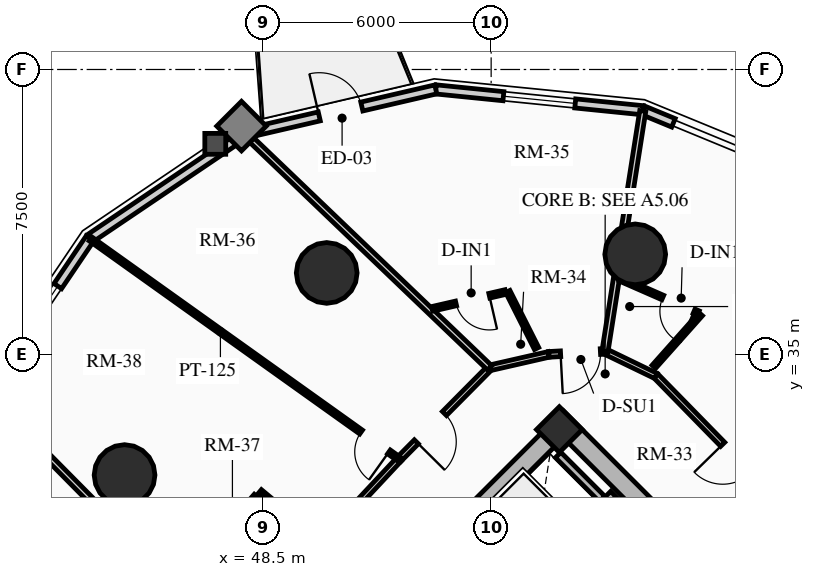
"""IFC4 building model, lengths in metres.
Left out: names, types, materials, properties, quantities, classifications, styles, units other than length and angle.
Written with IfcOpenShell. Run it as: python <this file> out.ifc"""

import sys

from ifc_helpers import new_model, si_unit, direction, frame, frame_2d, origin, origin_2d, place, context, subcontext, project, spatial, rectangle, circle, extrude, source, transform, mapped, element, fill, save


model = new_model("IFC4")
c1 = context("Model", 3, precision=1e-05, world=origin(), true_north=direction((0.0, 1.0)))
c2 = subcontext(c1, "Body", "Model", "MODEL_VIEW")
j1 = project(units=[si_unit("LENGTHUNIT", "METRE"), si_unit("PLANEANGLEUNIT", "RADIAN")], contexts=[c1])
p1 = place(None, origin())
s1 = spatial("IfcSite", under=j1, at=p1, CompositionType="ELEMENT")
p2 = place(p1, origin())
s2 = spatial("IfcBuilding", under=s1, at=p2, CompositionType="ELEMENT")
p3 = place(p2, frame((0.0, 0.0, 48.19)))
s3 = spatial("IfcBuildingStorey", under=s2, at=p3, CompositionType="ELEMENT", Elevation=48.19)
p4 = place(p3, frame((66.339, 23.227, 0.0), z_axis=(0.0, 0.0, 1.0), x_axis=(-0.707106781187, 0.707106781187, 0.0)))
e1 = element("IfcWall", 1, at=p4, inside=s3, PredefinedType="SHEAR", context=c2, shape_type="SweptSolid", body=[
    extrude(rectangle(XDim=14.3, YDim=0.5, at=frame_2d((7.15, 0.0))), origin(), (0.0, 0.0, 1.0), 2.91),
])
p5 = place(p3, frame((48.838, 25.596, 0.0), z_axis=(0.0, 0.0, 1.0), x_axis=(0.707106781187, 0.707106781187, 0.0)))
e2 = element("IfcWall", 2, at=p5, inside=s3, PredefinedType="SHEAR", context=c2, shape_type="SweptSolid", body=[
    extrude(rectangle(XDim=10.7, YDim=0.5, at=frame_2d((5.35, 0.0))), origin(), (0.0, 0.0, 1.0), 2.91),
])
m1 = source(origin(), c2, "Body", "SweptSolid", [
    extrude(rectangle(XDim=1.5, YDim=2.02, at=frame_2d((0.75, 1.01))), frame((0.0, 0.26, 0.0), z_axis=(0.0, -1.0, 0.0), x_axis=(1.0, 0.0, 0.0)), (0.0, 0.0, 1.0), 0.52),
])
p6 = place(p5, frame((4.6, 0.0, 0.0)))
e3 = element("IfcOpeningElement", 3, at=p6, cuts=e2, PredefinedType="OPENING", context=c2, shape_type="MappedRepresentation", body=[
    mapped(m1, transform((0.0, 0.0, 0.0), x_axis=(1.0, 0.0, 0.0), y_axis=(0.0, 1.0, 0.0), z_axis=(0.0, 0.0, 1.0), scale=1.0)),
])
p7 = place(p3, frame((56.294, 33.024, 0.0), z_axis=(0.0, 0.0, 1.0), x_axis=(0.707106781187, 0.707106781187, 0.0)))
e4 = element("IfcColumn", 4, at=p7, inside=s3, PredefinedType="COLUMN", context=c2, shape_type="SweptSolid", body=[
    extrude(rectangle(XDim=0.85, YDim=0.85, at=origin_2d()), origin(), (0.0, 0.0, 1.0), 2.91),
])
for number, where, z_axis, x_axis in (
    (5, (58.291, 37.635, 0.0), (0.0, 0.0, 1.0), (1.0, 0.0, 0.0)),
    (6, (50.173, 37.146, 0.0), (0.0, 0.0, 1.0), (1.0, 0.0, 0.0)),
    (7, (44.854, 31.827, 0.0), (0.0, 0.0, 1.0), (1.0, 0.0, 0.0)),
):
    element("IfcColumn", number, at=place(p3, frame(where, z_axis=z_axis, x_axis=x_axis)), inside=s3, PredefinedType="USERDEFINED", context=c2, shape_type="SweptSolid", body=[
        extrude(circle(Radius=0.8, at=origin_2d()), origin(), (0.0, 0.0, 1.0), 2.91),
    ])
p8 = place(p3, frame((58.493, 41.428, 0.0), z_axis=(0.0, 0.0, 1.0), x_axis=(0.924556017656, -0.381046152345, 0.0)))
e8 = element("IfcWall", 8, at=p8, inside=s3, PredefinedType="SOLIDWALL", context=c2, shape_type="SweptSolid", body=[
    extrude(rectangle(XDim=0.87, YDim=0.24, at=frame_2d((0.435, 0.0))), origin(), (0.0, 0.0, 1.0), 2.073),
])
p9 = place(p3, frame((53.043, 41.976, 0.0), z_axis=(0.0, 0.0, 1.0), x_axis=(0.994970765694, -0.100165739718, 0.0)))
e9 = element("IfcWall", 9, at=p9, inside=s3, PredefinedType="SOLIDWALL", context=c2, shape_type="SweptSolid", body=[
    extrude(rectangle(XDim=5.477, YDim=0.24, at=frame_2d((2.738, 0.0))), origin(), (0.0, 0.0, 1.0), 2.073),
])
m2 = source(origin(), c2, "Body", "SweptSolid", [
    extrude(rectangle(XDim=1.9, YDim=1.35, at=frame_2d((0.95, 0.675))), frame((0.0, 0.13, 0.0), z_axis=(0.0, -1.0, 0.0), x_axis=(1.0, 0.0, 0.0)), (0.0, 0.0, 1.0), 0.26),
])
p10 = place(p9, frame((1.788, 0.0, 0.65)))
e10 = element("IfcOpeningElement", 10, at=p10, cuts=e9, PredefinedType="OPENING", context=c2, shape_type="MappedRepresentation", body=[
    mapped(m2, transform((0.0, 0.0, 0.0), x_axis=(1.0, 0.0, 0.0), y_axis=(0.0, 1.0, 0.0), z_axis=(0.0, 0.0, 1.0), scale=1.0)),
])
p11 = place(p3, frame((48.031, 40.814, 0.0), z_axis=(0.0, 0.0, 1.0), x_axis=(0.974166016949, 0.225833060959, 0.0)))
e11 = element("IfcWall", 11, at=p11, inside=s3, PredefinedType="SOLIDWALL", context=c2, shape_type="SweptSolid", body=[
    extrude(rectangle(XDim=5.146, YDim=0.24, at=frame_2d((2.573, 0.0))), origin(), (0.0, 0.0, 1.0), 2.073),
])
m3 = source(origin(), c2, "Body", "SweptSolid", [
    extrude(rectangle(XDim=1.15, YDim=2.005, at=frame_2d((0.575, 1.002))), frame((0.0, 0.13, 0.0), z_axis=(0.0, -1.0, 0.0), x_axis=(1.0, 0.0, 0.0)), (0.0, 0.0, 1.0), 0.26),
])
p12 = place(p11, frame((1.998, 0.0, 0.0)))
e12 = element("IfcOpeningElement", 12, at=p12, cuts=e11, PredefinedType="OPENING", context=c2, shape_type="MappedRepresentation", body=[
    mapped(m3, transform((0.0, 0.0, 0.0), x_axis=(1.0, 0.0, 0.0), y_axis=(0.0, 1.0, 0.0), z_axis=(0.0, 0.0, 1.0), scale=1.0)),
])
p13 = place(p3, frame((43.945, 38.055, 0.0), z_axis=(0.0, 0.0, 1.0), x_axis=(0.828736708604, 0.559638693991, 0.0)))
e13 = element("IfcWall", 13, at=p13, inside=s3, PredefinedType="SOLIDWALL", context=c2, shape_type="SweptSolid", body=[
    extrude(rectangle(XDim=4.93, YDim=0.24, at=frame_2d((2.465, 0.0))), origin(), (0.0, 0.0, 1.0), 2.073),
])
p14 = place(p3, frame((41.186, 33.969, 0.0), z_axis=(0.0, 0.0, 1.0), x_axis=(0.559638693991, 0.828736708604, 0.0)))
e14 = element("IfcWall", 14, at=p14, inside=s3, PredefinedType="SOLIDWALL", context=c2, shape_type="SweptSolid", body=[
    extrude(rectangle(XDim=4.93, YDim=0.24, at=frame_2d((2.465, 0.0))), origin(), (0.0, 0.0, 1.0), 2.073),
])
p15 = place(p14, frame((1.515, 0.0, 0.65)))
e15 = element("IfcOpeningElement", 15, at=p15, cuts=e14, PredefinedType="OPENING", context=c2, shape_type="MappedRepresentation", body=[
    mapped(m2, transform((0.0, 0.0, 0.0), x_axis=(1.0, 0.0, 0.0), y_axis=(0.0, 1.0, 0.0), z_axis=(0.0, 0.0, 1.0), scale=1.0)),
])
p16 = place(p3, frame((55.615, 29.227, 0.0), z_axis=(0.0, 0.0, 1.0), x_axis=(0.707147878904, 0.70706568108, 0.0)))
e16 = element("IfcWall", 16, at=p16, inside=s3, PredefinedType="SHEAR", context=c2, shape_type="SweptSolid", body=[
    extrude(rectangle(XDim=2.97, YDim=0.2, at=frame_2d((1.485, 0.0))), origin(), (0.0, 0.0, 1.0), 2.91),
])
p17 = place(p3, frame((57.419, 31.2, 0.0), z_axis=(0.0, 0.0, 1.0), x_axis=(-0.707032117043, 0.707181437447, 0.0)))
e17 = element("IfcWall", 17, at=p17, inside=s3, PredefinedType="SHEAR", context=c2, shape_type="SweptSolid", body=[
    extrude(rectangle(XDim=1.635, YDim=0.2, at=frame_2d((0.817, 0.0))), origin(), (0.0, 0.0, 1.0), 2.91),
])
p18 = place(p3, frame((63.086, 30.086, 0.0), z_axis=(0.0, 0.0, 1.0), x_axis=(-0.699032802832, 0.715089603172, 0.0)))
e18 = element("IfcWall", 18, at=p18, inside=s3, PredefinedType="PARTITIONING", context=c2, shape_type="SweptSolid", body=[
    extrude(rectangle(XDim=6.082, YDim=0.15, at=frame_2d((3.041, 0.0))), origin(), (0.0, 0.0, 1.0), 2.159),
])
m4 = source(origin(), c2, "Body", "SweptSolid", [
    extrude(rectangle(XDim=1.05, YDim=2.015, at=frame_2d((0.525, 1.007))), frame((0.0, 0.085, 0.0), z_axis=(0.0, -1.0, 0.0), x_axis=(1.0, 0.0, 0.0)), (0.0, 0.0, 1.0), 0.17),
])
p19 = place(p18, frame((2.516, 0.0, 0.0)))
e19 = element("IfcOpeningElement", 19, at=p19, cuts=e18, PredefinedType="OPENING", context=c2, shape_type="MappedRepresentation", body=[
    mapped(m4, transform((0.0, 0.0, 0.0), x_axis=(1.0, 0.0, 0.0), y_axis=(0.0, 1.0, 0.0), z_axis=(0.0, 0.0, 1.0), scale=1.0)),
])
p20 = place(p3, frame((58.835, 34.435, 0.0), z_axis=(0.0, 0.0, 1.0), x_axis=(-0.900352167336, 0.4351620098, 0.0)))
e20 = element("IfcWall", 20, at=p20, inside=s3, PredefinedType="PARTITIONING", context=c2, shape_type="SweptSolid", body=[
    extrude(rectangle(XDim=1.488, YDim=0.15, at=frame_2d((0.744, 0.0))), origin(), (0.0, 0.0, 1.0), 2.205),
])
p21 = place(p3, frame((57.495, 35.083, 0.0), z_axis=(0.0, 0.0, 1.0), x_axis=(-0.998536503254, -0.054081897798, 0.0)))
e21 = element("IfcWall", 21, at=p21, inside=s3, PredefinedType="PARTITIONING", context=c2, shape_type="SweptSolid", body=[
    extrude(rectangle(XDim=1.481, YDim=0.15, at=frame_2d((0.74, 0.0))), origin(), (0.0, 0.0, 1.0), 2.159),
])
p22 = place(p21, frame((0.12, 0.0, 0.0)))
e22 = element("IfcOpeningElement", 22, at=p22, cuts=e21, PredefinedType="OPENING", context=c2, shape_type="MappedRepresentation", body=[
    mapped(m4, transform((0.0, 0.0, 0.0), x_axis=(1.0, 0.0, 0.0), y_axis=(0.0, 1.0, 0.0), z_axis=(0.0, 0.0, 1.0), scale=1.0)),
])
p23 = place(p3, frame((56.017, 35.003, 0.0), z_axis=(0.0, 0.0, 1.0), x_axis=(-0.974924954781, -0.222533890777, 0.0)))
e23 = element("IfcWall", 23, at=p23, inside=s3, PredefinedType="PARTITIONING", context=c2, shape_type="SweptSolid", body=[
    extrude(rectangle(XDim=1.595, YDim=0.15, at=frame_2d((0.798, 0.0))), origin(), (0.0, 0.0, 1.0), 2.205),
])
p24 = place(p3, frame((54.461, 34.648, 0.0), z_axis=(0.0, 0.0, 1.0), x_axis=(-0.70403409755, -0.710166170334, 0.0)))
e24 = element("IfcWall", 24, at=p24, inside=s3, PredefinedType="PARTITIONING", context=c2, shape_type="SweptSolid", body=[
    extrude(rectangle(XDim=3.384, YDim=0.15, at=frame_2d((1.692, 0.0))), origin(), (0.0, 0.0, 1.0), 2.159),
])
p25 = place(p24, frame((1.691, 0.0, 0.0)))
e25 = element("IfcOpeningElement", 25, at=p25, cuts=e24, PredefinedType="OPENING", context=c2, shape_type="MappedRepresentation", body=[
    mapped(m4, transform((0.0, 0.0, 0.0), x_axis=(1.0, 0.0, 0.0), y_axis=(0.0, 1.0, 0.0), z_axis=(0.0, 0.0, 1.0), scale=1.0)),
])
p26 = place(p3, frame((52.079, 32.244, 0.0), z_axis=(0.0, 0.0, 1.0), x_axis=(-0.682703325574, -0.730695674854, 0.0)))
e26 = element("IfcWall", 26, at=p26, inside=s3, PredefinedType="PARTITIONING", context=c2, shape_type="SweptSolid", body=[
    extrude(rectangle(XDim=6.527, YDim=0.15, at=frame_2d((3.263, 0.0))), origin(), (0.0, 0.0, 1.0), 2.159),
])
p27 = place(p3, frame((57.495, 35.083, 0.0), z_axis=(0.0, 0.0, 1.0), x_axis=(0.155296837382, 0.987867851638, 0.0)))
e27 = element("IfcWall", 27, at=p27, inside=s3, PredefinedType="PARTITIONING", context=c2, shape_type="SweptSolid", body=[
    extrude(rectangle(XDim=6.403, YDim=0.16, at=frame_2d((3.202, 0.0))), origin(), (0.0, 0.0, 1.0), 2.073),
])
p28 = place(p3, frame((54.461, 34.648, 0.0), z_axis=(0.0, 0.0, 1.0), x_axis=(-0.722290498621, 0.691589788532, 0.0)))
e28 = element("IfcWall", 28, at=p28, inside=s3, PredefinedType="PARTITIONING", context=c2, shape_type="SweptSolid", body=[
    extrude(rectangle(XDim=8.891, YDim=0.16, at=frame_2d((4.445, 0.0))), origin(), (0.0, 0.0, 1.0), 2.073),
])
p29 = place(p3, frame((47.623, 27.475, 0.0), z_axis=(0.0, 0.0, 1.0), x_axis=(-0.703512438021, 0.71068294587, 0.0)))
e29 = element("IfcWall", 29, at=p29, inside=s3, PredefinedType="PARTITIONING", context=c2, shape_type="SweptSolid", body=[
    extrude(rectangle(XDim=9.125, YDim=0.16, at=frame_2d((4.562, 0.0))), origin(), (0.0, 0.0, 1.0), 2.073),
])
p30 = place(p3, frame((55.695, 35.158, 0.0), z_axis=(0.0, 0.0, 1.0), x_axis=(-0.450698346964, 0.892676313142, 0.0)))
e30 = element("IfcWall", 30, at=p30, inside=s3, PredefinedType="PARTITIONING", context=c2, shape_type="SweptSolid", body=[
    extrude(rectangle(XDim=1.68, YDim=0.125, at=frame_2d((0.84, 0.0))), origin(), (0.0, 0.0, 1.0), 2.205),
])
p31 = place(p3, frame((54.878, 36.644, 0.0), z_axis=(0.0, 0.0, 1.0), x_axis=(-0.974554917581, -0.224148862631, 0.0)))
e31 = element("IfcWall", 31, at=p31, inside=s3, PredefinedType="PARTITIONING", context=c2, shape_type="SweptSolid", body=[
    extrude(rectangle(XDim=1.982, YDim=0.125, at=frame_2d((0.991, 0.0))), origin(), (0.0, 0.0, 1.0), 2.635),
])
m5 = source(origin(), c2, "Body", "SweptSolid", [
    extrude(rectangle(XDim=0.9, YDim=2.005, at=frame_2d((0.45, 1.002))), frame((0.0, 0.073, 0.0), z_axis=(0.0, -1.0, 0.0), x_axis=(1.0, 0.0, 0.0)), (0.0, 0.0, 1.0), 0.145),
])
p32 = place(p31, frame((0.436, 0.0, 0.0)))
e32 = element("IfcOpeningElement", 32, at=p32, cuts=e31, PredefinedType="OPENING", context=c2, shape_type="MappedRepresentation", body=[
    mapped(m5, transform((0.0, 0.0, 0.0), x_axis=(1.0, 0.0, 0.0), y_axis=(0.0, 1.0, 0.0), z_axis=(0.0, 0.0, 1.0), scale=1.0)),
])
p33 = place(p3, frame((52.079, 32.244, 0.0), z_axis=(0.0, 0.0, 1.0), x_axis=(-0.813888867537, 0.581020577346, 0.0)))
e33 = element("IfcWall", 33, at=p33, inside=s3, PredefinedType="PARTITIONING", context=c2, shape_type="SweptSolid", body=[
    extrude(rectangle(XDim=9.977, YDim=0.125, at=frame_2d((4.988, 0.0))), origin(), (0.0, 0.0, 1.0), 2.073),
])
p34 = place(p33, frame((0.33, 0.0, 0.0)))
e34 = element("IfcOpeningElement", 34, at=p34, cuts=e33, PredefinedType="OPENING", context=c2, shape_type="MappedRepresentation", body=[
    mapped(m5, transform((0.0, 0.0, 0.0), x_axis=(1.0, 0.0, 0.0), y_axis=(0.0, 1.0, 0.0), z_axis=(0.0, 0.0, 1.0), scale=1.0)),
])
p35 = place(p3, frame((49.809, 30.234, 0.0), z_axis=(0.0, 0.0, 1.0), x_axis=(-0.76830950514, 0.640078514177, 0.0)))
e35 = element("IfcWall", 35, at=p35, inside=s3, PredefinedType="PARTITIONING", context=c2, shape_type="SweptSolid", body=[
    extrude(rectangle(XDim=1.814, YDim=0.125, at=frame_2d((0.907, 0.0))), origin(), (0.0, 0.0, 1.0), 2.635),
])
p36 = place(p3, frame((48.313, 31.28, 0.0), z_axis=(0.0, 0.0, 1.0), x_axis=(-0.662230126621, -0.749300513409, 0.0)))
e36 = element("IfcWall", 36, at=p36, inside=s3, PredefinedType="PARTITIONING", context=c2, shape_type="SweptSolid", body=[
    extrude(rectangle(XDim=2.958, YDim=0.125, at=frame_2d((1.479, 0.0))), origin(), (0.0, 0.0, 1.0), 2.159),
])
p37 = place(p36, frame((0.12, 0.0, 0.0)))
e37 = element("IfcOpeningElement", 37, at=p37, cuts=e36, PredefinedType="OPENING", context=c2, shape_type="MappedRepresentation", body=[
    mapped(m5, transform((0.0, 0.0, 0.0), x_axis=(1.0, 0.0, 0.0), y_axis=(0.0, 1.0, 0.0), z_axis=(0.0, 0.0, 1.0), scale=1.0)),
])
p38 = place(p3, frame((58.78, 34.676, 0.0), z_axis=(0.0, 0.0, 1.0), x_axis=(0.6649433297, 0.746893813261, 0.0)))
e38 = element("IfcWall", 38, at=p38, inside=s3, PredefinedType="PARTITIONING", context=c2, shape_type="SweptSolid", body=[
    extrude(rectangle(XDim=1.856, YDim=0.125, at=frame_2d((0.928, 0.0))), origin(), (0.0, 0.0, 1.0), 2.205),
])
p39 = place(p3, frame((59.95, 36.09, 0.0), z_axis=(0.0, 0.0, 1.0), x_axis=(-0.916037613906, 0.401092370795, 0.0)))
e39 = element("IfcWall", 39, at=p39, inside=s3, PredefinedType="PARTITIONING", context=c2, shape_type="SweptSolid", body=[
    extrude(rectangle(XDim=2.247, YDim=0.125, at=frame_2d((1.124, 0.0))), origin(), (0.0, 0.0, 1.0), 2.159),
])
p40 = place(p39, frame((0.12, 0.0, 0.0)))
e40 = element("IfcOpeningElement", 40, at=p40, cuts=e39, PredefinedType="OPENING", context=c2, shape_type="MappedRepresentation", body=[
    mapped(m5, transform((0.0, 0.0, 0.0), x_axis=(1.0, 0.0, 0.0), y_axis=(0.0, 1.0, 0.0), z_axis=(0.0, 0.0, 1.0), scale=1.0)),
])
m6 = source(origin(), c2, "Body", "SweptSolid", [
    extrude(rectangle(XDim=1.9, YDim=1.35, at=frame_2d((0.95, 0.675))), frame((0.0, 0.03, 0.0), z_axis=(0.0, -1.0, 0.0), x_axis=(1.0, 0.0, 0.0)), (0.0, 0.0, 1.0), 0.06),
])
p41 = place(p10, origin())
e41 = element("IfcWindow", 41, at=p41, inside=s3, PartitioningType="DOUBLE_PANEL_VERTICAL", PredefinedType="WINDOW", context=c2, shape_type="MappedRepresentation", body=[
    mapped(m6, transform((0.0, 0.0, 0.0), x_axis=(1.0, 0.0, 0.0), y_axis=(0.0, 1.0, 0.0), z_axis=(0.0, 0.0, 1.0), scale=1.0)),
])
fill(e10, e41)
m7 = source(origin(), c2, "Body", "SweptSolid", [
    extrude(rectangle(XDim=1.15, YDim=2.005, at=frame_2d((0.575, 1.002))), frame((0.0, 0.025, 0.0), z_axis=(0.0, -1.0, 0.0), x_axis=(1.0, 0.0, 0.0)), (0.0, 0.0, 1.0), 0.05),
])
p42 = place(p12, origin())
e42 = element("IfcDoor", 42, at=p42, inside=s3, OperationType="SINGLE_SWING_LEFT", PredefinedType="DOOR", context=c2, shape_type="MappedRepresentation", body=[
    mapped(m7, transform((0.0, 0.0, 0.0), x_axis=(1.0, 0.0, 0.0), y_axis=(0.0, 1.0, 0.0), z_axis=(0.0, 0.0, 1.0), scale=1.0)),
])
fill(e12, e42)
p43 = place(p15, origin())
e43 = element("IfcWindow", 43, at=p43, inside=s3, PartitioningType="DOUBLE_PANEL_VERTICAL", PredefinedType="WINDOW", context=c2, shape_type="MappedRepresentation", body=[
    mapped(m6, transform((0.0, 0.0, 0.0), x_axis=(1.0, 0.0, 0.0), y_axis=(0.0, 1.0, 0.0), z_axis=(0.0, 0.0, 1.0), scale=1.0)),
])
fill(e15, e43)
m8 = source(origin(), c2, "Body", "SweptSolid", [
    extrude(rectangle(XDim=1.05, YDim=2.015, at=frame_2d((0.525, 1.007))), frame((0.0, 0.025, 0.0), z_axis=(0.0, -1.0, 0.0), x_axis=(1.0, 0.0, 0.0)), (0.0, 0.0, 1.0), 0.05),
])
p44 = place(p22, origin())
e44 = element("IfcDoor", 44, at=p44, inside=s3, OperationType="SINGLE_SWING_RIGHT", PredefinedType="DOOR", context=c2, shape_type="MappedRepresentation", body=[
    mapped(m8, transform((0.0, 0.0, 0.0), x_axis=(1.0, 0.0, 0.0), y_axis=(0.0, 1.0, 0.0), z_axis=(0.0, 0.0, 1.0), scale=1.0)),
])
fill(e22, e44)
m9 = source(origin(), c2, "Body", "SweptSolid", [
    extrude(rectangle(XDim=0.9, YDim=2.005, at=frame_2d((0.45, 1.002))), frame((0.0, 0.025, 0.0), z_axis=(0.0, -1.0, 0.0), x_axis=(1.0, 0.0, 0.0)), (0.0, 0.0, 1.0), 0.05),
])
p45 = place(p32, origin())
e45 = element("IfcDoor", 45, at=p45, inside=s3, OperationType="SINGLE_SWING_LEFT", PredefinedType="DOOR", context=c2, shape_type="MappedRepresentation", body=[
    mapped(m9, transform((0.0, 0.0, 0.0), x_axis=(1.0, 0.0, 0.0), y_axis=(0.0, 1.0, 0.0), z_axis=(0.0, 0.0, 1.0), scale=1.0)),
])
fill(e32, e45)
p46 = place(p25, origin())
e46 = element("IfcDoor", 46, at=p46, inside=s3, OperationType="SINGLE_SWING_RIGHT", PredefinedType="DOOR", context=c2, shape_type="MappedRepresentation", body=[
    mapped(m8, transform((0.0, 0.0, 0.0), x_axis=(1.0, 0.0, 0.0), y_axis=(0.0, 1.0, 0.0), z_axis=(0.0, 0.0, 1.0), scale=1.0)),
])
fill(e25, e46)
p47 = place(p34, origin())
e47 = element("IfcDoor", 47, at=p47, inside=s3, OperationType="SINGLE_SWING_LEFT", PredefinedType="DOOR", context=c2, shape_type="MappedRepresentation", body=[
    mapped(m9, transform((0.0, 0.0, 0.0), x_axis=(1.0, 0.0, 0.0), y_axis=(0.0, 1.0, 0.0), z_axis=(0.0, 0.0, 1.0), scale=1.0)),
])
fill(e34, e47)
p48 = place(p19, origin())
e48 = element("IfcDoor", 48, at=p48, inside=s3, OperationType="SINGLE_SWING_RIGHT", PredefinedType="DOOR", context=c2, shape_type="MappedRepresentation", body=[
    mapped(m8, transform((0.0, 0.0, 0.0), x_axis=(1.0, 0.0, 0.0), y_axis=(0.0, 1.0, 0.0), z_axis=(0.0, 0.0, 1.0), scale=1.0)),
])
fill(e19, e48)
p49 = place(p40, origin())
e49 = element("IfcDoor", 49, at=p49, inside=s3, OperationType="SINGLE_SWING_LEFT", PredefinedType="DOOR", context=c2, shape_type="MappedRepresentation", body=[
    mapped(m9, transform((0.0, 0.0, 0.0), x_axis=(1.0, 0.0, 0.0), y_axis=(0.0, 1.0, 0.0), z_axis=(0.0, 0.0, 1.0), scale=1.0)),
])
fill(e40, e49)
save(model, sys.argv[1])
